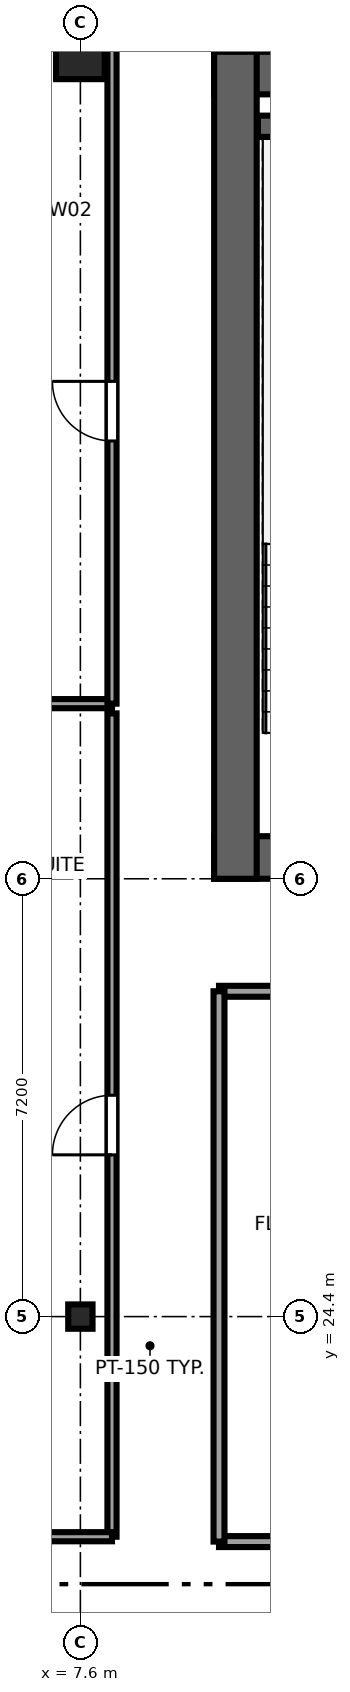
"""IFC4 building model, lengths in metres.
Left out: names, types, materials, properties, quantities, classifications, styles, units other than length and angle.
Written with IfcOpenShell. Run it as: python <this file> out.ifc"""

import sys

from ifc_helpers import new_model, si_unit, direction, frame, frame_2d, origin, origin_2d, place, context, subcontext, project, spatial, rectangle, i_section, extrude, source, transform, mapped, element, fill, save


model = new_model("IFC4")
c1 = context("Model", 3, precision=1e-05, world=origin(), true_north=direction((0.0, 1.0)))
c2 = subcontext(c1, "Body", "Model", "MODEL_VIEW")
j1 = project(units=[si_unit("LENGTHUNIT", "METRE"), si_unit("PLANEANGLEUNIT", "RADIAN")], contexts=[c1])
p1 = place(None, origin())
s1 = spatial("IfcSite", under=j1, at=p1, CompositionType="ELEMENT")
p2 = place(p1, origin())
s2 = spatial("IfcBuilding", under=s1, at=p2, CompositionType="ELEMENT")
p3 = place(p2, frame((0.0, 0.0, 179.0)))
s3 = spatial("IfcBuildingStorey", under=s2, at=p3, CompositionType="ELEMENT", Elevation=179.0)
p4 = place(p3, frame((9.8, 31.95, 0.0), z_axis=(0.0, 0.0, 1.0), x_axis=(1.0, 0.0, 0.0)))
e1 = element("IfcWall", 1, at=p4, inside=s3, PredefinedType="SHEAR", context=c2, shape_type="SweptSolid", body=[
    extrude(rectangle(XDim=26.4, YDim=0.7, at=frame_2d((13.2, 0.0))), origin(), (0.0, 0.0, 1.0), 3.55),
])
p5 = place(p4, frame((6.32, 0.0, 0.0), z_axis=(0.0, 0.0, 1.0), x_axis=(-1.0, 0.0, 0.0)))
e2 = element("IfcOpeningElement", 2, at=p5, cuts=e1, PredefinedType="OPENING", context=c2, shape_type="SweptSolid", body=[
    extrude(rectangle(XDim=1.5, YDim=2.04, at=frame_2d((0.75, 1.02))), frame((0.0, 0.36, 0.0), z_axis=(0.0, -1.0, 0.0), x_axis=(1.0, 0.0, 0.0)), (0.0, 0.0, 1.0), 0.72),
])
p6 = place(p4, frame((13.95, 0.0, 0.0), z_axis=(0.0, 0.0, 1.0), x_axis=(-1.0, 0.0, 0.0)))
e3 = element("IfcOpeningElement", 3, at=p6, cuts=e1, PredefinedType="OPENING", context=c2, shape_type="SweptSolid", body=[
    extrude(rectangle(XDim=1.5, YDim=2.04, at=frame_2d((0.75, 1.02))), frame((0.0, 0.36, 0.0), z_axis=(0.0, -1.0, 0.0), x_axis=(1.0, 0.0, 0.0)), (0.0, 0.0, 1.0), 0.72),
])
p7 = place(p4, frame((21.58, 0.0, 0.0), z_axis=(0.0, 0.0, 1.0), x_axis=(-1.0, 0.0, 0.0)))
e4 = element("IfcOpeningElement", 4, at=p7, cuts=e1, PredefinedType="OPENING", context=c2, shape_type="SweptSolid", body=[
    extrude(rectangle(XDim=1.5, YDim=2.04, at=frame_2d((0.75, 1.02))), frame((0.0, 0.36, 0.0), z_axis=(0.0, -1.0, 0.0), x_axis=(1.0, 0.0, 0.0)), (0.0, 0.0, 1.0), 0.72),
])
p8 = place(p4, frame((8.37, 0.0, 0.0), z_axis=(0.0, 0.0, 1.0), x_axis=(-1.0, 0.0, 0.0)))
e5 = element("IfcOpeningElement", 5, at=p8, cuts=e1, PredefinedType="OPENING", context=c2, shape_type="SweptSolid", body=[
    extrude(rectangle(XDim=0.82, YDim=2.01, at=frame_2d((0.41, 1.005))), frame((0.0, 0.36, 0.0), z_axis=(0.0, -1.0, 0.0), x_axis=(1.0, 0.0, 0.0)), (0.0, 0.0, 1.0), 0.72),
])
p9 = place(p4, frame((18.87, 0.0, 0.0), z_axis=(0.0, 0.0, 1.0), x_axis=(-1.0, 0.0, 0.0)))
e6 = element("IfcOpeningElement", 6, at=p9, cuts=e1, PredefinedType="OPENING", context=c2, shape_type="SweptSolid", body=[
    extrude(rectangle(XDim=0.82, YDim=2.01, at=frame_2d((0.41, 1.005))), frame((0.0, 0.36, 0.0), z_axis=(0.0, -1.0, 0.0), x_axis=(1.0, 0.0, 0.0)), (0.0, 0.0, 1.0), 0.72),
])
p10 = place(p3, frame((9.8, 44.85, 0.0), z_axis=(0.0, 0.0, 1.0), x_axis=(1.0, 0.0, 0.0)))
e7 = element("IfcWall", 7, at=p10, inside=s3, PredefinedType="SHEAR", context=c2, shape_type="SweptSolid", body=[
    extrude(rectangle(XDim=26.4, YDim=0.7, at=frame_2d((13.2, 0.0))), origin(), (0.0, 0.0, 1.0), 3.55),
])
p11 = place(p3, frame((10.15, 31.6, 0.0), z_axis=(0.0, 0.0, 1.0), x_axis=(0.0, 1.0, 0.0)))
e8 = element("IfcWall", 8, at=p11, inside=s3, PredefinedType="SHEAR", context=c2, shape_type="SweptSolid", body=[
    extrude(rectangle(XDim=13.6, YDim=0.7, at=frame_2d((6.8, 0.0))), origin(), (0.0, 0.0, 1.0), 3.55),
])
p12 = place(p3, frame((10.52, 43.975, 0.0), z_axis=(0.0, 0.0, 1.0), x_axis=(1.0, 0.0, 0.0)))
e9 = element("IfcWall", 9, at=p12, inside=s3, PredefinedType="SHEAR", context=c2, shape_type="SweptSolid", body=[
    extrude(rectangle(XDim=3.6, YDim=0.35, at=frame_2d((1.8, 0.0))), origin(), (0.0, 0.0, 1.0), 3.55),
])
m1 = source(origin(), c2, "Body", "SweptSolid", [
    extrude(i_section(OverallWidth=0.4, OverallDepth=0.4, WebThickness=0.02, FlangeThickness=0.035, at=origin_2d()), origin(), (0.0, 0.0, 1.0), 3.55),
])
p13 = place(p3, frame((7.6, 24.4, 0.0), z_axis=(0.0, 0.0, 1.0), x_axis=(1.0, 0.0, 0.0)))
e10 = element("IfcColumn", 10, at=p13, inside=s3, PredefinedType="COLUMN", context=c2, shape_type="MappedRepresentation", body=[
    mapped(m1, transform((0.0, 0.0, 0.0), x_axis=(1.0, 0.0, 0.0), y_axis=(0.0, 1.0, 0.0), z_axis=(0.0, 0.0, 1.0), scale=1.0)),
])
m2 = source(origin(), c2, "Body", "SweptSolid", [
    extrude(rectangle(XDim=0.8, YDim=0.8, at=origin_2d()), origin(), (0.0, 0.0, 1.0), 3.55),
])
p14 = place(p3, frame((7.6, 45.15, 0.0), z_axis=(0.0, 0.0, 1.0), x_axis=(1.0, 0.0, 0.0)))
e11 = element("IfcColumn", 11, at=p14, inside=s3, PredefinedType="COLUMN", context=c2, shape_type="MappedRepresentation", body=[
    mapped(m2, transform((0.0, 0.0, 0.0), x_axis=(1.0, 0.0, 0.0), y_axis=(0.0, 1.0, 0.0), z_axis=(0.0, 0.0, 1.0), scale=1.0)),
])
p15 = place(p3, frame((3.005, 34.48, 0.0), z_axis=(0.0, 0.0, 1.0), x_axis=(1.0, 0.0, 0.0)))
e12 = element("IfcWall", 12, at=p15, inside=s3, PredefinedType="PARTITIONING", context=c2, shape_type="SweptSolid", body=[
    extrude(rectangle(XDim=5.115, YDim=0.15, at=frame_2d((2.558, 0.0))), origin(), (0.0, 0.0, 1.0), 3.25),
])
p16 = place(p3, frame((8.12, 20.78, 0.0), z_axis=(0.0, 0.0, 1.0), x_axis=(0.0, 1.0, 0.0)))
e13 = element("IfcWall", 13, at=p16, inside=s3, PredefinedType="PARTITIONING", context=c2, shape_type="SweptSolid", body=[
    extrude(rectangle(XDim=13.54, YDim=0.15, at=frame_2d((6.77, 0.0))), origin(), (0.0, 0.0, 1.0), 3.25),
])
p17 = place(p16, frame((6.28, 0.0, 0.0)))
e14 = element("IfcOpeningElement", 14, at=p17, cuts=e13, PredefinedType="OPENING", context=c2, shape_type="SweptSolid", body=[
    extrude(rectangle(XDim=0.98, YDim=2.12, at=frame_2d((0.49, 1.06))), frame((0.0, 0.085, 0.0), z_axis=(0.0, -1.0, 0.0), x_axis=(1.0, 0.0, 0.0)), (0.0, 0.0, 1.0), 0.17),
])
p18 = place(p3, frame((5.07, 20.78, 0.0), z_axis=(0.0, 0.0, 1.0), x_axis=(1.0, 0.0, 0.0)))
e15 = element("IfcWall", 15, at=p18, inside=s3, PredefinedType="PARTITIONING", context=c2, shape_type="SweptSolid", body=[
    extrude(rectangle(XDim=3.05, YDim=0.15, at=frame_2d((1.525, 0.0))), origin(), (0.0, 0.0, 1.0), 3.25),
])
p19 = place(p3, frame((8.12, 34.48, 0.0), z_axis=(0.0, 0.0, 1.0), x_axis=(0.0, 1.0, 0.0)))
e16 = element("IfcWall", 16, at=p19, inside=s3, PredefinedType="PARTITIONING", context=c2, shape_type="SweptSolid", body=[
    extrude(rectangle(XDim=11.115, YDim=0.15, at=frame_2d((5.558, 0.0))), origin(), (0.0, 0.0, 1.0), 3.25),
])
p20 = place(p19, frame((4.32, 0.0, 0.0)))
e17 = element("IfcOpeningElement", 17, at=p20, cuts=e16, PredefinedType="OPENING", context=c2, shape_type="SweptSolid", body=[
    extrude(rectangle(XDim=0.98, YDim=2.12, at=frame_2d((0.49, 1.06))), frame((0.0, 0.085, 0.0), z_axis=(0.0, -1.0, 0.0), x_axis=(1.0, 0.0, 0.0)), (0.0, 0.0, 1.0), 0.17),
])
p21 = place(p3, frame((9.88, 20.7, 0.0), z_axis=(0.0, 0.0, 1.0), x_axis=(1.0, 0.0, 0.0)))
e18 = element("IfcWall", 18, at=p21, inside=s3, PredefinedType="PARTITIONING", context=c2, shape_type="SweptSolid", body=[
    extrude(rectangle(XDim=4.22, YDim=0.18, at=frame_2d((2.11, 0.0))), origin(), (0.0, 0.0, 1.0), 3.25),
])
p22 = place(p21, frame((1.285, 0.0, 0.0)))
e19 = element("IfcOpeningElement", 19, at=p22, cuts=e18, PredefinedType="OPENING", context=c2, shape_type="SweptSolid", body=[
    extrude(rectangle(XDim=1.65, YDim=2.15, at=frame_2d((0.825, 1.075))), frame((0.0, 0.1, 0.0), z_axis=(0.0, -1.0, 0.0), x_axis=(1.0, 0.0, 0.0)), (0.0, 0.0, 1.0), 0.2),
])
p23 = place(p3, frame((9.88, 29.75, 0.0), z_axis=(0.0, 0.0, 1.0), x_axis=(1.0, 0.0, 0.0)))
e20 = element("IfcWall", 20, at=p23, inside=s3, PredefinedType="PARTITIONING", context=c2, shape_type="SweptSolid", body=[
    extrude(rectangle(XDim=4.22, YDim=0.18, at=frame_2d((2.11, 0.0))), origin(), (0.0, 0.0, 1.0), 3.25),
])
p24 = place(p3, frame((9.88, 20.7, 0.0), z_axis=(0.0, 0.0, 1.0), x_axis=(0.0, 1.0, 0.0)))
e21 = element("IfcWall", 21, at=p24, inside=s3, PredefinedType="PARTITIONING", context=c2, shape_type="SweptSolid", body=[
    extrude(rectangle(XDim=9.05, YDim=0.18, at=frame_2d((4.525, 0.0))), origin(), (0.0, 0.0, 1.0), 3.25),
])
m3 = source(origin(), c2, "Body", "SweptSolid", [
    extrude(rectangle(XDim=0.98, YDim=2.12, at=frame_2d((0.49, 1.06))), frame((0.0, 0.025, 0.0), z_axis=(0.0, -1.0, 0.0), x_axis=(1.0, 0.0, 0.0)), (0.0, 0.0, 1.0), 0.05),
])
p25 = place(p17, origin())
e22 = element("IfcDoor", 22, at=p25, inside=s3, OperationType="SINGLE_SWING_LEFT", PredefinedType="DOOR", context=c2, shape_type="MappedRepresentation", body=[
    mapped(m3, transform((0.0, 0.0, 0.0), x_axis=(1.0, 0.0, 0.0), y_axis=(0.0, 1.0, 0.0), z_axis=(0.0, 0.0, 1.0), scale=1.0)),
])
fill(e14, e22)
p26 = place(p20, origin())
e23 = element("IfcDoor", 23, at=p26, inside=s3, OperationType="SINGLE_SWING_RIGHT", PredefinedType="DOOR", context=c2, shape_type="MappedRepresentation", body=[
    mapped(m3, transform((0.0, 0.0, 0.0), x_axis=(1.0, 0.0, 0.0), y_axis=(0.0, 1.0, 0.0), z_axis=(0.0, 0.0, 1.0), scale=1.0)),
])
fill(e17, e23)
save(model, sys.argv[1])
